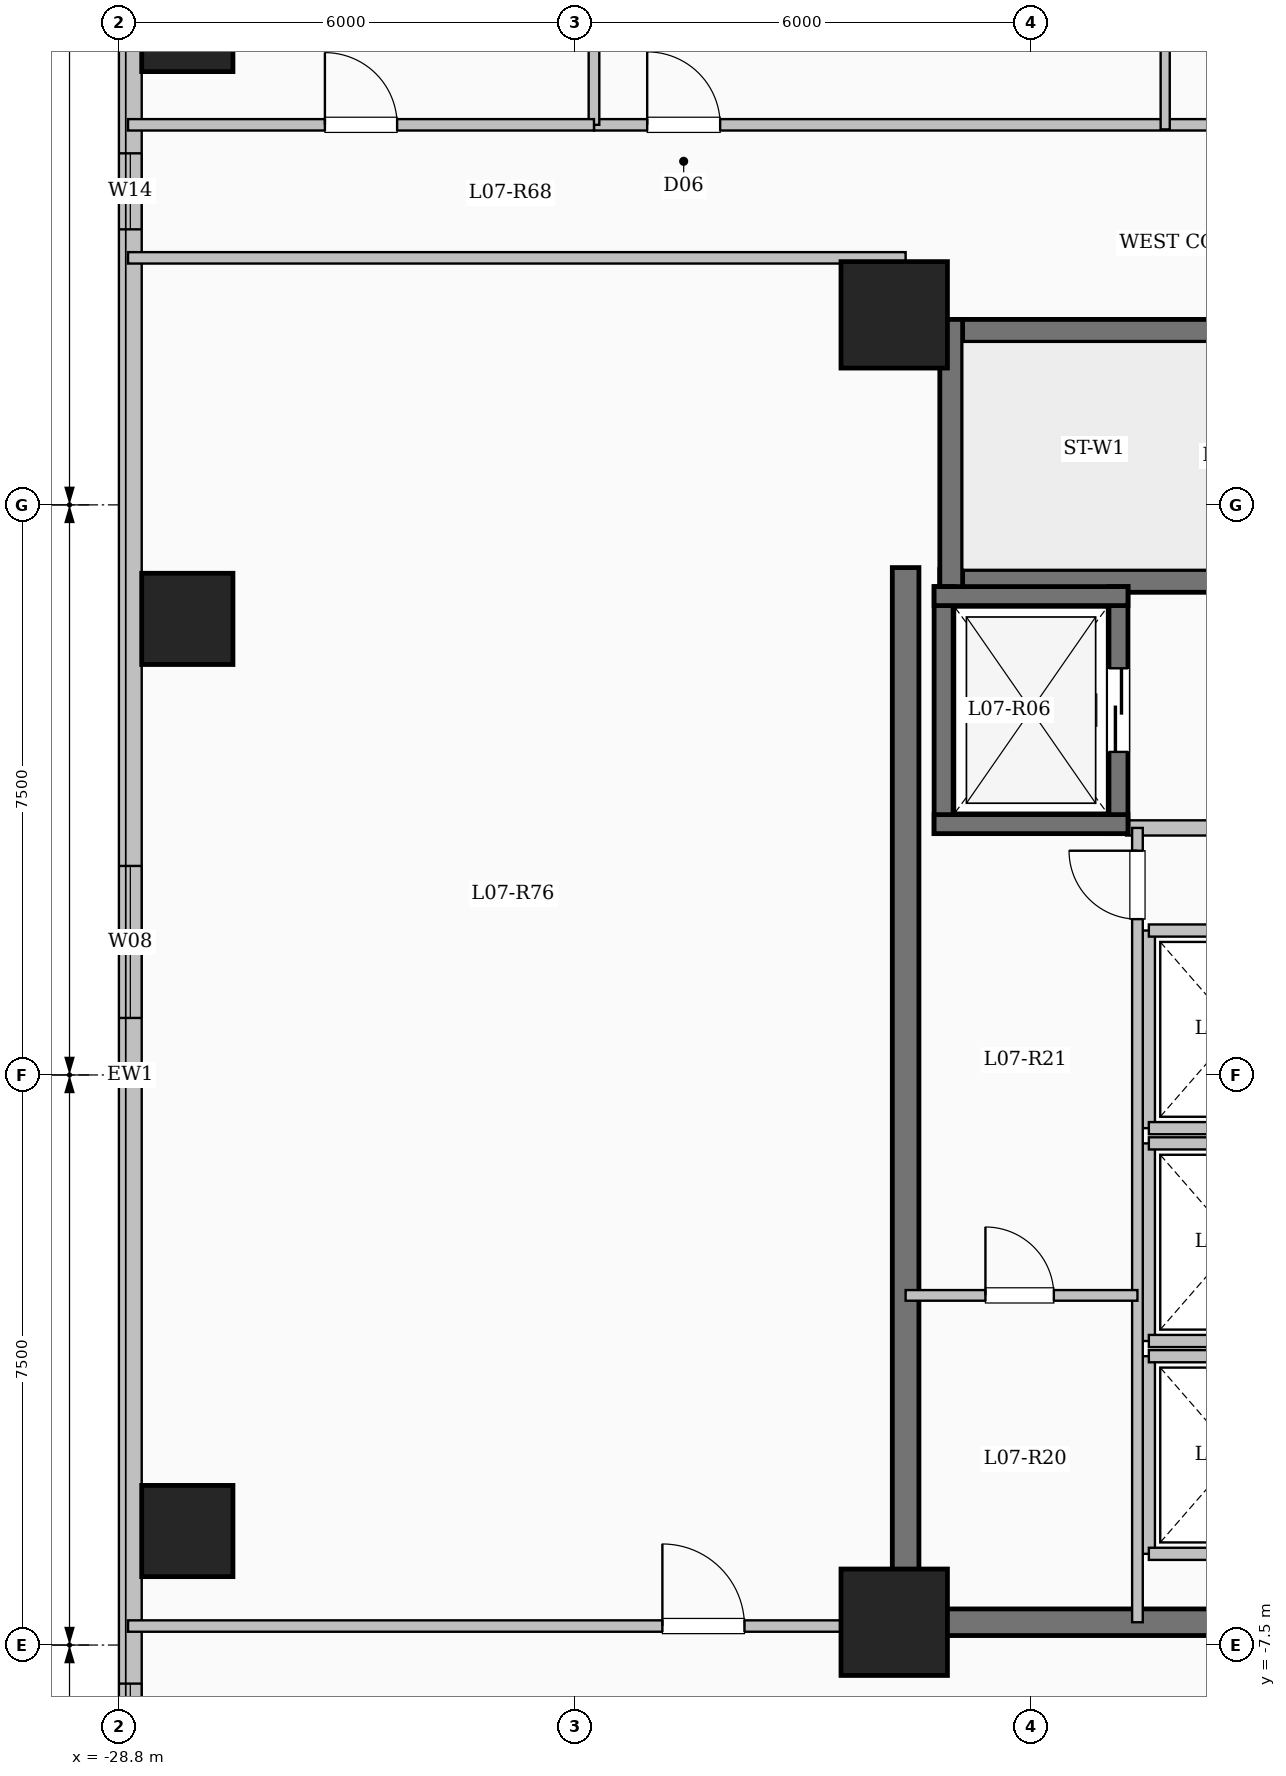
"""IFC4 building model, lengths in metres.
Left out: names, types, materials, properties, quantities, classifications, styles, units other than length and angle.
Written with IfcOpenShell. Run it as: python <this file> out.ifc"""

import sys

from ifc_helpers import new_model, si_unit, direction, frame, frame_2d, origin, origin_2d, place, context, subcontext, project, spatial, rectangle, extrude, element, fill, save


model = new_model("IFC4")
c1 = context("Model", 3, precision=1e-05, world=origin(), true_north=direction((0.0, 1.0)))
c2 = subcontext(c1, "Body", "Model", "MODEL_VIEW")
j1 = project(units=[si_unit("LENGTHUNIT", "METRE"), si_unit("PLANEANGLEUNIT", "RADIAN")], contexts=[c1])
p1 = place(None, origin())
s1 = spatial("IfcSite", under=j1, at=p1, CompositionType="ELEMENT")
p2 = place(p1, origin())
s2 = spatial("IfcBuilding", under=s1, at=p2, CompositionType="ELEMENT")
p3 = place(p2, frame((0.0, 0.0, 30.7)))
s3 = spatial("IfcBuildingStorey", under=s2, at=p3, CompositionType="ELEMENT", Elevation=30.7)
for number, where, z_axis, x_axis in (
    (1, (-18.6, -7.2, 0.0), (0.0, 0.0, 1.0), (1.0, 0.0, 0.0)),
    (2, (-18.6, 10.0, 0.0), (0.0, 0.0, 1.0), (1.0, 0.0, 0.0)),
):
    element("IfcColumn", number, at=place(p3, frame(where, z_axis=z_axis, x_axis=x_axis)), inside=s3, PredefinedType="COLUMN", context=c2, shape_type="SweptSolid", body=[
        extrude(rectangle(XDim=1.4, YDim=1.4, at=origin_2d()), origin(), (0.0, 0.0, 1.0), 3.35),
    ])
for number, where, z_axis, x_axis in (
    (3, (-27.9, -6.0, 0.0), (0.0, 0.0, 1.0), (1.0, 0.0, 0.0)),
    (4, (-27.9, 6.0, 0.0), (0.0, 0.0, 1.0), (1.0, 0.0, 0.0)),
    (5, (-27.9, 13.8, 0.0), (0.0, 0.0, 1.0), (1.0, 0.0, 0.0)),
):
    element("IfcColumn", number, at=place(p3, frame(where, z_axis=z_axis, x_axis=x_axis)), inside=s3, PredefinedType="COLUMN", context=c2, shape_type="SweptSolid", body=[
        extrude(rectangle(XDim=1.2, YDim=1.2, at=origin_2d()), origin(), (0.0, 0.0, 1.0), 3.35),
    ])
p4 = place(p3, frame((-28.65, -19.05, 0.0), z_axis=(0.0, 0.0, 1.0), x_axis=(0.0, 1.0, 0.0)))
e6 = element("IfcWall", 6, at=p4, inside=s3, PredefinedType="SOLIDWALL", context=c2, shape_type="SweptSolid", body=[
    extrude(rectangle(XDim=38.1, YDim=0.3, at=frame_2d((19.05, 0.0))), origin(), (0.0, 0.0, 1.0), 3.1),
])
p5 = place(p4, frame((3.15, 0.0, 0.9)))
e7 = element("IfcOpeningElement", 7, at=p5, cuts=e6, PredefinedType="OPENING", context=c2, shape_type="SweptSolid", body=[
    extrude(rectangle(XDim=2.4, YDim=1.8, at=frame_2d((1.2, 0.9))), frame((0.0, 0.16, 0.0), z_axis=(0.0, -1.0, 0.0), x_axis=(1.0, 0.0, 0.0)), (0.0, 0.0, 1.0), 0.32),
])
p6 = place(p4, frame((9.542, 0.0, 0.9)))
e8 = element("IfcOpeningElement", 8, at=p6, cuts=e6, PredefinedType="OPENING", context=c2, shape_type="SweptSolid", body=[
    extrude(rectangle(XDim=1.5, YDim=1.65, at=frame_2d((0.75, 0.825))), frame((0.0, 0.16, 0.0), z_axis=(0.0, -1.0, 0.0), x_axis=(1.0, 0.0, 0.0)), (0.0, 0.0, 1.0), 0.32),
])
p7 = place(p4, frame((19.8, 0.0, 0.9)))
e9 = element("IfcOpeningElement", 9, at=p7, cuts=e6, PredefinedType="OPENING", context=c2, shape_type="SweptSolid", body=[
    extrude(rectangle(XDim=2.0, YDim=1.7, at=frame_2d((1.0, 0.85))), frame((0.0, 0.16, 0.0), z_axis=(0.0, -1.0, 0.0), x_axis=(1.0, 0.0, 0.0)), (0.0, 0.0, 1.0), 0.32),
])
p8 = place(p4, frame((30.175, 0.0, 0.95)))
e10 = element("IfcOpeningElement", 10, at=p8, cuts=e6, PredefinedType="OPENING", context=c2, shape_type="SweptSolid", body=[
    extrude(rectangle(XDim=1.0, YDim=1.5, at=frame_2d((0.5, 0.75))), frame((0.0, 0.16, 0.0), z_axis=(0.0, -1.0, 0.0), x_axis=(1.0, 0.0, 0.0)), (0.0, 0.0, 1.0), 0.32),
])
p9 = place(p4, frame((33.85, 0.0, 0.9)))
e11 = element("IfcOpeningElement", 11, at=p9, cuts=e6, PredefinedType="OPENING", context=c2, shape_type="SweptSolid", body=[
    extrude(rectangle(XDim=2.0, YDim=1.7, at=frame_2d((1.0, 0.85))), frame((0.0, 0.16, 0.0), z_axis=(0.0, -1.0, 0.0), x_axis=(1.0, 0.0, 0.0)), (0.0, 0.0, 1.0), 0.32),
])
p10 = place(p3, frame((-18.0, 9.79, 0.0), z_axis=(0.0, 0.0, 1.0), x_axis=(1.0, 0.0, 0.0)))
e12 = element("IfcWall", 12, at=p10, inside=s3, PredefinedType="SHEAR", context=c2, shape_type="SweptSolid", body=[
    extrude(rectangle(XDim=8.0, YDim=0.3, at=frame_2d((4.0, 0.0))), origin(), (0.0, 0.0, 1.0), 3.35),
])
p11 = place(p3, frame((-18.0, 6.5, 0.0), z_axis=(0.0, 0.0, 1.0), x_axis=(1.0, 0.0, 0.0)))
e13 = element("IfcWall", 13, at=p11, inside=s3, PredefinedType="SHEAR", context=c2, shape_type="SweptSolid", body=[
    extrude(rectangle(XDim=8.0, YDim=0.3, at=frame_2d((4.0, 0.0))), origin(), (0.0, 0.0, 1.0), 3.35),
])
p12 = place(p11, frame((6.45, 0.0, 0.0)))
e14 = element("IfcOpeningElement", 14, at=p12, cuts=e13, PredefinedType="OPENING", context=c2, shape_type="SweptSolid", body=[
    extrude(rectangle(XDim=1.0, YDim=2.15, at=frame_2d((0.5, 1.075))), frame((0.0, 0.16, 0.0), z_axis=(0.0, -1.0, 0.0), x_axis=(1.0, 0.0, 0.0)), (0.0, 0.0, 1.0), 0.32),
])
p13 = place(p3, frame((-17.85, 6.35, 0.0), z_axis=(0.0, 0.0, 1.0), x_axis=(0.0, 1.0, 0.0)))
e15 = element("IfcWall", 15, at=p13, inside=s3, PredefinedType="SHEAR", context=c2, shape_type="SweptSolid", body=[
    extrude(rectangle(XDim=3.59, YDim=0.3, at=frame_2d((1.795, 0.0))), origin(), (0.0, 0.0, 1.0), 3.35),
])
p14 = place(p3, frame((-15.55, 3.25, 0.0), z_axis=(0.0, 0.0, 1.0), x_axis=(1.0, 0.0, 0.0)))
e16 = element("IfcWall", 16, at=p14, inside=s3, PredefinedType="SOLIDWALL", context=c2, shape_type="SweptSolid", body=[
    extrude(rectangle(XDim=5.4, YDim=0.2, at=frame_2d((2.7, 0.0))), origin(), (0.0, 0.0, 1.0), 3.1),
])
p15 = place(p3, frame((-17.95, 3.175, 0.0), z_axis=(0.0, 0.0, 1.0), x_axis=(0.0, 1.0, 0.0)))
e17 = element("IfcWall", 17, at=p15, inside=s3, PredefinedType="SHEAR", context=c2, shape_type="SweptSolid", body=[
    extrude(rectangle(XDim=3.25, YDim=0.25, at=frame_2d((1.625, 0.0))), origin(), (0.0, 0.0, 1.0), 3.35),
])
p16 = place(p3, frame((-15.65, 3.175, 0.0), z_axis=(0.0, 0.0, 1.0), x_axis=(0.0, 1.0, 0.0)))
e18 = element("IfcWall", 18, at=p16, inside=s3, PredefinedType="SHEAR", context=c2, shape_type="SweptSolid", body=[
    extrude(rectangle(XDim=3.25, YDim=0.25, at=frame_2d((1.625, 0.0))), origin(), (0.0, 0.0, 1.0), 3.35),
])
p17 = place(p16, frame((1.075, 0.0, 0.0)))
e19 = element("IfcOpeningElement", 19, at=p17, cuts=e18, PredefinedType="OPENING", context=c2, shape_type="SweptSolid", body=[
    extrude(rectangle(XDim=1.1, YDim=2.15, at=frame_2d((0.55, 1.075))), frame((0.0, 0.135, 0.0), z_axis=(0.0, -1.0, 0.0), x_axis=(1.0, 0.0, 0.0)), (0.0, 0.0, 1.0), 0.27),
])
for number, where, z_axis, x_axis in (
    (20, (-18.075, 3.3, 0.0), (0.0, 0.0, 1.0), (1.0, 0.0, 0.0)),
    (21, (-18.075, 6.3, 0.0), (0.0, 0.0, 1.0), (1.0, 0.0, 0.0)),
):
    element("IfcWall", number, at=place(p3, frame(where, z_axis=z_axis, x_axis=x_axis)), inside=s3, PredefinedType="SHEAR", context=c2, shape_type="SweptSolid", body=[
        extrude(rectangle(XDim=2.55, YDim=0.25, at=frame_2d((1.275, 0.0))), origin(), (0.0, 0.0, 1.0), 3.35),
    ])
p18 = place(p3, frame((-15.25, -6.3, 0.0), z_axis=(0.0, 0.0, 1.0), x_axis=(0.0, 1.0, 0.0)))
e22 = element("IfcWall", 22, at=p18, inside=s3, PredefinedType="SOLIDWALL", context=c2, shape_type="SweptSolid", body=[
    extrude(rectangle(XDim=2.6, YDim=0.16, at=frame_2d((1.3, 0.0))), origin(), (0.0, 0.0, 1.0), 3.1),
])
for number, where, z_axis, x_axis in (
    (23, (-15.25, -6.3, 0.0), (0.0, 0.0, 1.0), (1.0, 0.0, 0.0)),
    (24, (-15.25, -3.7, 0.0), (0.0, 0.0, 1.0), (1.0, 0.0, 0.0)),
):
    element("IfcWall", number, at=place(p3, frame(where, z_axis=z_axis, x_axis=x_axis)), inside=s3, PredefinedType="SOLIDWALL", context=c2, shape_type="SweptSolid", body=[
        extrude(rectangle(XDim=2.3, YDim=0.16, at=frame_2d((1.15, 0.0))), origin(), (0.0, 0.0, 1.0), 3.1),
    ])
p19 = place(p3, frame((-15.25, -3.5, 0.0), z_axis=(0.0, 0.0, 1.0), x_axis=(0.0, 1.0, 0.0)))
e25 = element("IfcWall", 25, at=p19, inside=s3, PredefinedType="SOLIDWALL", context=c2, shape_type="SweptSolid", body=[
    extrude(rectangle(XDim=2.6, YDim=0.16, at=frame_2d((1.3, 0.0))), origin(), (0.0, 0.0, 1.0), 3.1),
])
for number, where, z_axis, x_axis in (
    (26, (-15.25, -3.5, 0.0), (0.0, 0.0, 1.0), (1.0, 0.0, 0.0)),
    (27, (-15.25, -0.9, 0.0), (0.0, 0.0, 1.0), (1.0, 0.0, 0.0)),
):
    element("IfcWall", number, at=place(p3, frame(where, z_axis=z_axis, x_axis=x_axis)), inside=s3, PredefinedType="SOLIDWALL", context=c2, shape_type="SweptSolid", body=[
        extrude(rectangle(XDim=2.3, YDim=0.16, at=frame_2d((1.15, 0.0))), origin(), (0.0, 0.0, 1.0), 3.1),
    ])
p20 = place(p3, frame((-15.25, -0.7, 0.0), z_axis=(0.0, 0.0, 1.0), x_axis=(0.0, 1.0, 0.0)))
e28 = element("IfcWall", 28, at=p20, inside=s3, PredefinedType="SOLIDWALL", context=c2, shape_type="SweptSolid", body=[
    extrude(rectangle(XDim=2.6, YDim=0.16, at=frame_2d((1.3, 0.0))), origin(), (0.0, 0.0, 1.0), 3.1),
])
for number, where, z_axis, x_axis in (
    (29, (-15.25, -0.7, 0.0), (0.0, 0.0, 1.0), (1.0, 0.0, 0.0)),
    (30, (-15.25, 1.9, 0.0), (0.0, 0.0, 1.0), (1.0, 0.0, 0.0)),
):
    element("IfcWall", number, at=place(p3, frame(where, z_axis=z_axis, x_axis=x_axis)), inside=s3, PredefinedType="SOLIDWALL", context=c2, shape_type="SweptSolid", body=[
        extrude(rectangle(XDim=2.3, YDim=0.16, at=frame_2d((1.15, 0.0))), origin(), (0.0, 0.0, 1.0), 3.1),
    ])
p21 = place(p3, frame((-18.45, -7.375, 0.0), z_axis=(0.0, 0.0, 1.0), x_axis=(0.0, 1.0, 0.0)))
e31 = element("IfcWall", 31, at=p21, inside=s3, PredefinedType="SHEAR", context=c2, shape_type="SweptSolid", body=[
    extrude(rectangle(XDim=14.05, YDim=0.35, at=frame_2d((7.025, 0.0))), origin(), (0.0, 0.0, 1.0), 3.35),
])
p22 = place(p3, frame((-18.625, -7.2, 0.0), z_axis=(0.0, 0.0, 1.0), x_axis=(1.0, 0.0, 0.0)))
e32 = element("IfcWall", 32, at=p22, inside=s3, PredefinedType="SHEAR", context=c2, shape_type="SweptSolid", body=[
    extrude(rectangle(XDim=8.55, YDim=0.35, at=frame_2d((4.275, 0.0))), origin(), (0.0, 0.0, 1.0), 3.35),
])
p23 = place(p3, frame((-15.4, -7.2, 0.0), z_axis=(0.0, 0.0, 1.0), x_axis=(0.0, 1.0, 0.0)))
e33 = element("IfcWall", 33, at=p23, inside=s3, PredefinedType="PARTITIONING", context=c2, shape_type="SweptSolid", body=[
    extrude(rectangle(XDim=10.45, YDim=0.14, at=frame_2d((5.225, 0.0))), origin(), (0.0, 0.0, 1.0), 3.1),
])
p24 = place(p23, frame((9.25, 0.0, 0.0)))
e34 = element("IfcOpeningElement", 34, at=p24, cuts=e33, PredefinedType="OPENING", context=c2, shape_type="SweptSolid", body=[
    extrude(rectangle(XDim=0.9, YDim=2.08, at=frame_2d((0.45, 1.04))), frame((0.0, 0.08, 0.0), z_axis=(0.0, -1.0, 0.0), x_axis=(1.0, 0.0, 0.0)), (0.0, 0.0, 1.0), 0.16),
])
p25 = place(p3, frame((-18.45, -2.9, 0.0), z_axis=(0.0, 0.0, 1.0), x_axis=(1.0, 0.0, 0.0)))
e35 = element("IfcWall", 35, at=p25, inside=s3, PredefinedType="PARTITIONING", context=c2, shape_type="SweptSolid", body=[
    extrude(rectangle(XDim=3.05, YDim=0.14, at=frame_2d((1.525, 0.0))), origin(), (0.0, 0.0, 1.0), 3.1),
])
p26 = place(p25, frame((1.05, 0.0, 0.0)))
e36 = element("IfcOpeningElement", 36, at=p26, cuts=e35, PredefinedType="OPENING", context=c2, shape_type="SweptSolid", body=[
    extrude(rectangle(XDim=0.9, YDim=2.08, at=frame_2d((0.45, 1.04))), frame((0.0, 0.08, 0.0), z_axis=(0.0, -1.0, 0.0), x_axis=(1.0, 0.0, 0.0)), (0.0, 0.0, 1.0), 0.16),
])
p27 = place(p3, frame((-22.55, 12.5, 0.0), z_axis=(0.0, 0.0, 1.0), x_axis=(1.0, 0.0, 0.0)))
e37 = element("IfcWall", 37, at=p27, inside=s3, PredefinedType="PARTITIONING", context=c2, shape_type="SweptSolid", body=[
    extrude(rectangle(XDim=18.7, YDim=0.15, at=frame_2d((9.35, 0.0))), origin(), (0.0, 0.0, 1.0), 3.1),
])
p28 = place(p27, frame((0.7, 0.0, 0.0)))
e38 = element("IfcOpeningElement", 38, at=p28, cuts=e37, PredefinedType="OPENING", context=c2, shape_type="SweptSolid", body=[
    extrude(rectangle(XDim=0.96, YDim=2.15, at=frame_2d((0.48, 1.075))), frame((0.0, 0.085, 0.0), z_axis=(0.0, -1.0, 0.0), x_axis=(1.0, 0.0, 0.0)), (0.0, 0.0, 1.0), 0.17),
])
p29 = place(p3, frame((-15.035, 12.44, 0.0), z_axis=(0.0, 0.0, 1.0), x_axis=(0.0, 1.0, 0.0)))
e39 = element("IfcWall", 39, at=p29, inside=s3, PredefinedType="PARTITIONING", context=c2, shape_type="SweptSolid", body=[
    extrude(rectangle(XDim=11.16, YDim=0.12, at=frame_2d((5.58, 0.0))), origin(), (0.0, 0.0, 1.0), 2.435),
])
p30 = place(p29, frame((2.905, 0.0, 0.0)))
e40 = element("IfcOpeningElement", 40, at=p30, cuts=e39, PredefinedType="OPENING", context=c2, shape_type="SweptSolid", body=[
    extrude(rectangle(XDim=1.08, YDim=2.15, at=frame_2d((0.54, 1.075))), frame((0.0, 0.07, 0.0), z_axis=(0.0, -1.0, 0.0), x_axis=(1.0, 0.0, 0.0)), (0.0, 0.0, 1.0), 0.14),
])
p31 = place(p3, frame((-28.68, -7.25, 0.0), z_axis=(0.0, 0.0, 1.0), x_axis=(1.0, 0.0, 0.0)))
e41 = element("IfcWall", 41, at=p31, inside=s3, PredefinedType="PARTITIONING", context=c2, shape_type="SweptSolid", body=[
    extrude(rectangle(XDim=10.23, YDim=0.15, at=frame_2d((5.115, 0.0))), origin(), (0.0, 0.0, 1.0), 3.1),
])
p32 = place(p31, frame((7.03, 0.0, 0.0)))
e42 = element("IfcOpeningElement", 42, at=p32, cuts=e41, PredefinedType="OPENING", context=c2, shape_type="SweptSolid", body=[
    extrude(rectangle(XDim=1.08, YDim=2.15, at=frame_2d((0.54, 1.075))), frame((0.0, 0.085, 0.0), z_axis=(0.0, -1.0, 0.0), x_axis=(1.0, 0.0, 0.0)), (0.0, 0.0, 1.0), 0.17),
])
p33 = place(p3, frame((-28.68, 10.75, 0.0), z_axis=(0.0, 0.0, 1.0), x_axis=(1.0, 0.0, 0.0)))
e43 = element("IfcWall", 43, at=p33, inside=s3, PredefinedType="PARTITIONING", context=c2, shape_type="SweptSolid", body=[
    extrude(rectangle(XDim=10.23, YDim=0.15, at=frame_2d((5.115, 0.0))), origin(), (0.0, 0.0, 1.0), 3.1),
])
p34 = place(p3, frame((-22.55, 12.5, 0.0), z_axis=(0.0, 0.0, 1.0), x_axis=(0.0, 1.0, 0.0)))
e44 = element("IfcWall", 44, at=p34, inside=s3, PredefinedType="PARTITIONING", context=c2, shape_type="SweptSolid", body=[
    extrude(rectangle(XDim=6.55, YDim=0.14, at=frame_2d((3.275, 0.0))), origin(), (0.0, 0.0, 1.0), 3.1),
])
p35 = place(p3, frame((-28.68, 12.5, 0.0), z_axis=(0.0, 0.0, 1.0), x_axis=(1.0, 0.0, 0.0)))
e45 = element("IfcWall", 45, at=p35, inside=s3, PredefinedType="PARTITIONING", context=c2, shape_type="SweptSolid", body=[
    extrude(rectangle(XDim=6.13, YDim=0.15, at=frame_2d((3.065, 0.0))), origin(), (0.0, 0.0, 1.0), 3.1),
])
p36 = place(p35, frame((2.59, 0.0, 0.0)))
e46 = element("IfcOpeningElement", 46, at=p36, cuts=e45, PredefinedType="OPENING", context=c2, shape_type="SweptSolid", body=[
    extrude(rectangle(XDim=0.95, YDim=2.15, at=frame_2d((0.475, 1.075))), frame((0.0, 0.085, 0.0), z_axis=(0.0, -1.0, 0.0), x_axis=(1.0, 0.0, 0.0)), (0.0, 0.0, 1.0), 0.17),
])
p37 = place(p6, origin())
e47 = element("IfcWindow", 47, at=p37, inside=s3, PartitioningType="SINGLE_PANEL", PredefinedType="WINDOW", context=c2, shape_type="SweptSolid", body=[
    extrude(rectangle(XDim=1.5, YDim=1.65, at=frame_2d((0.75, 0.825))), frame((0.0, 0.03, 0.0), z_axis=(0.0, -1.0, 0.0), x_axis=(1.0, 0.0, 0.0)), (0.0, 0.0, 1.0), 0.06),
])
fill(e8, e47)
p38 = place(p7, origin())
e48 = element("IfcWindow", 48, at=p38, inside=s3, PartitioningType="SINGLE_PANEL", PredefinedType="WINDOW", context=c2, shape_type="SweptSolid", body=[
    extrude(rectangle(XDim=2.0, YDim=1.7, at=frame_2d((1.0, 0.85))), frame((0.0, 0.03, 0.0), z_axis=(0.0, -1.0, 0.0), x_axis=(1.0, 0.0, 0.0)), (0.0, 0.0, 1.0), 0.06),
])
fill(e9, e48)
p39 = place(p8, origin())
e49 = element("IfcWindow", 49, at=p39, inside=s3, PartitioningType="SINGLE_PANEL", PredefinedType="WINDOW", context=c2, shape_type="SweptSolid", body=[
    extrude(rectangle(XDim=1.0, YDim=1.5, at=frame_2d((0.5, 0.75))), frame((0.0, 0.03, 0.0), z_axis=(0.0, -1.0, 0.0), x_axis=(1.0, 0.0, 0.0)), (0.0, 0.0, 1.0), 0.06),
])
fill(e10, e49)
p40 = place(p17, origin())
e50 = element("IfcDoor", 50, at=p40, inside=s3, OperationType="SLIDING_TO_LEFT", PredefinedType="DOOR", context=c2, shape_type="SweptSolid", body=[
    extrude(rectangle(XDim=1.1, YDim=2.15, at=frame_2d((0.55, 1.075))), frame((0.0, 0.025, 0.0), z_axis=(0.0, -1.0, 0.0), x_axis=(1.0, 0.0, 0.0)), (0.0, 0.0, 1.0), 0.05),
])
fill(e19, e50)
p41 = place(p24, origin())
e51 = element("IfcDoor", 51, at=p41, inside=s3, OperationType="SINGLE_SWING_RIGHT", PredefinedType="DOOR", context=c2, shape_type="SweptSolid", body=[
    extrude(rectangle(XDim=0.9, YDim=2.08, at=frame_2d((0.45, 1.04))), frame((0.0, 0.025, 0.0), z_axis=(0.0, -1.0, 0.0), x_axis=(1.0, 0.0, 0.0)), (0.0, 0.0, 1.0), 0.05),
])
fill(e34, e51)
p42 = place(p26, origin())
e52 = element("IfcDoor", 52, at=p42, inside=s3, OperationType="SINGLE_SWING_LEFT", PredefinedType="DOOR", context=c2, shape_type="SweptSolid", body=[
    extrude(rectangle(XDim=0.9, YDim=2.08, at=frame_2d((0.45, 1.04))), frame((0.0, 0.025, 0.0), z_axis=(0.0, -1.0, 0.0), x_axis=(1.0, 0.0, 0.0)), (0.0, 0.0, 1.0), 0.05),
])
fill(e36, e52)
p43 = place(p28, origin())
e53 = element("IfcDoor", 53, at=p43, inside=s3, OperationType="SINGLE_SWING_LEFT", PredefinedType="DOOR", context=c2, shape_type="SweptSolid", body=[
    extrude(rectangle(XDim=0.96, YDim=2.15, at=frame_2d((0.48, 1.075))), frame((0.0, 0.025, 0.0), z_axis=(0.0, -1.0, 0.0), x_axis=(1.0, 0.0, 0.0)), (0.0, 0.0, 1.0), 0.05),
])
fill(e38, e53)
p44 = place(p36, origin())
e54 = element("IfcDoor", 54, at=p44, inside=s3, OperationType="SINGLE_SWING_LEFT", PredefinedType="DOOR", context=c2, shape_type="SweptSolid", body=[
    extrude(rectangle(XDim=0.95, YDim=2.15, at=frame_2d((0.475, 1.075))), frame((0.0, 0.025, 0.0), z_axis=(0.0, -1.0, 0.0), x_axis=(1.0, 0.0, 0.0)), (0.0, 0.0, 1.0), 0.05),
])
fill(e46, e54)
p45 = place(p32, origin())
e55 = element("IfcDoor", 55, at=p45, inside=s3, OperationType="SINGLE_SWING_LEFT", PredefinedType="DOOR", context=c2, shape_type="SweptSolid", body=[
    extrude(rectangle(XDim=1.08, YDim=2.15, at=frame_2d((0.54, 1.075))), frame((0.0, 0.025, 0.0), z_axis=(0.0, -1.0, 0.0), x_axis=(1.0, 0.0, 0.0)), (0.0, 0.0, 1.0), 0.05),
])
fill(e42, e55)
save(model, sys.argv[1])
